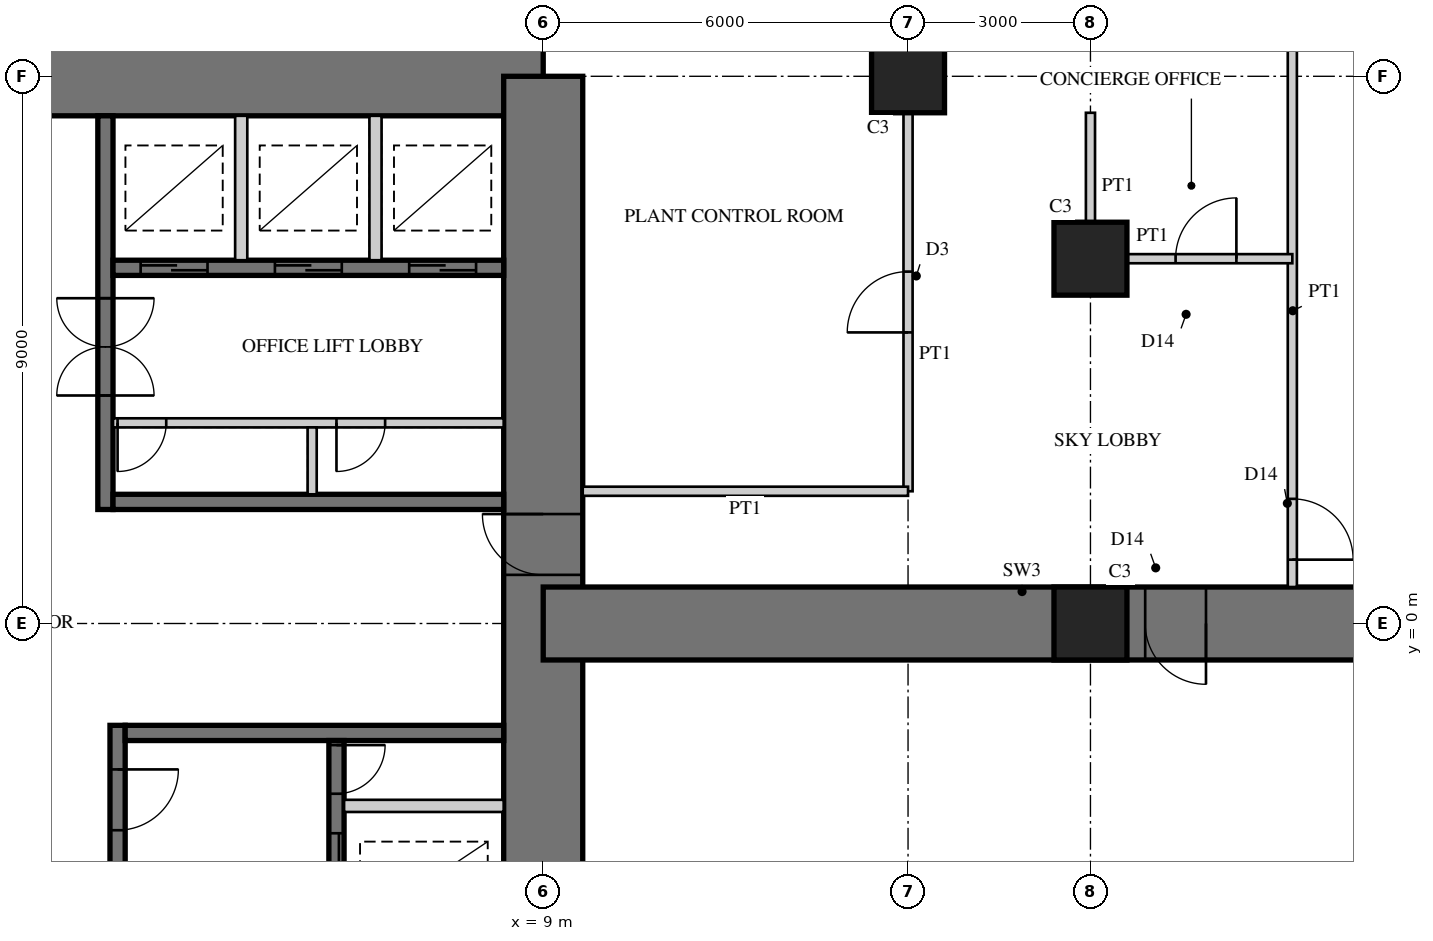
"""IFC4 building model, lengths in metres.
Left out: names, types, materials, properties, quantities, classifications, styles, units other than length and angle.
Written with IfcOpenShell. Run it as: python <this file> out.ifc"""

import sys

from ifc_helpers import new_model, si_unit, direction, frame, frame_2d, origin, origin_2d, place, context, subcontext, project, spatial, rectangle, extrude, element, fill, save


model = new_model("IFC4")
c1 = context("Model", 3, precision=1e-05, world=origin(), true_north=direction((0.0, 1.0)))
c2 = subcontext(c1, "Body", "Model", "MODEL_VIEW")
j1 = project(units=[si_unit("LENGTHUNIT", "METRE"), si_unit("PLANEANGLEUNIT", "RADIAN")], contexts=[c1])
p1 = place(None, origin())
s1 = spatial("IfcSite", under=j1, at=p1, CompositionType="ELEMENT")
p2 = place(p1, origin())
s2 = spatial("IfcBuilding", under=s1, at=p2, CompositionType="ELEMENT")
p3 = place(p2, frame((0.0, 0.0, 95.5)))
s3 = spatial("IfcBuildingStorey", under=s2, at=p3, CompositionType="ELEMENT", Elevation=95.5)
p4 = place(p3, frame((9.0, 9.0, 0.0), z_axis=(0.0, 0.0, 1.0), x_axis=(-1.0, 0.0, 0.0)))
e1 = element("IfcWall", 1, at=p4, inside=s3, PredefinedType="SHEAR", context=c2, shape_type="SweptSolid", body=[
    extrude(rectangle(XDim=18.0, YDim=1.3, at=frame_2d((9.0, 0.0))), origin(), (0.0, 0.0, 1.0), 5.0),
])
p5 = place(p4, frame((9.8, 0.0, 0.0)))
e2 = element("IfcOpeningElement", 2, at=p5, cuts=e1, PredefinedType="OPENING", context=c2, shape_type="SweptSolid", body=[
    extrude(rectangle(XDim=1.0, YDim=2.4, at=frame_2d((0.5, 1.2))), frame((0.0, 0.66, 0.0), z_axis=(0.0, -1.0, 0.0), x_axis=(1.0, 0.0, 0.0)), (0.0, 0.0, 1.0), 1.32),
])
p6 = place(p3, frame((9.0, -9.0, 0.0), z_axis=(0.0, 0.0, 1.0), x_axis=(0.0, 1.0, 0.0)))
e3 = element("IfcWall", 3, at=p6, inside=s3, PredefinedType="SHEAR", context=c2, shape_type="SweptSolid", body=[
    extrude(rectangle(XDim=18.0, YDim=1.3, at=frame_2d((9.0, 0.0))), origin(), (0.0, 0.0, 1.0), 5.0),
])
p7 = place(p6, frame((9.8, 0.0, 0.0)))
e4 = element("IfcOpeningElement", 4, at=p7, cuts=e3, PredefinedType="OPENING", context=c2, shape_type="SweptSolid", body=[
    extrude(rectangle(XDim=1.0, YDim=2.4, at=frame_2d((0.5, 1.2))), frame((0.0, 0.66, 0.0), z_axis=(0.0, -1.0, 0.0), x_axis=(1.0, 0.0, 0.0)), (0.0, 0.0, 1.0), 1.32),
])
p8 = place(p3, frame((1.8, 1.875, 0.0), z_axis=(0.0, 0.0, 1.0), x_axis=(0.0, 1.0, 0.0)))
e5 = element("IfcWall", 5, at=p8, inside=s3, PredefinedType="SHEAR", context=c2, shape_type="SweptSolid", body=[
    extrude(rectangle(XDim=6.475, YDim=0.25, at=frame_2d((3.238, 0.0))), origin(), (0.0, 0.0, 1.0), 5.0),
])
p9 = place(p8, frame((1.875, 0.0, 0.0)))
e6 = element("IfcOpeningElement", 6, at=p9, cuts=e5, PredefinedType="OPENING", context=c2, shape_type="SweptSolid", body=[
    extrude(rectangle(XDim=1.6, YDim=2.4, at=frame_2d((0.8, 1.2))), frame((0.0, 0.135, 0.0), z_axis=(0.0, -1.0, 0.0), x_axis=(1.0, 0.0, 0.0)), (0.0, 0.0, 1.0), 0.27),
])
p10 = place(p3, frame((1.925, 2.0, 0.0), z_axis=(0.0, 0.0, 1.0), x_axis=(1.0, 0.0, 0.0)))
e7 = element("IfcWall", 7, at=p10, inside=s3, PredefinedType="SHEAR", context=c2, shape_type="SweptSolid", body=[
    extrude(rectangle(XDim=6.425, YDim=0.25, at=frame_2d((3.212, 0.0))), origin(), (0.0, 0.0, 1.0), 5.0),
])
p11 = place(p3, frame((1.925, 5.85, 0.0), z_axis=(0.0, 0.0, 1.0), x_axis=(1.0, 0.0, 0.0)))
e8 = element("IfcWall", 8, at=p11, inside=s3, PredefinedType="SHEAR", context=c2, shape_type="SweptSolid", body=[
    extrude(rectangle(XDim=6.425, YDim=0.25, at=frame_2d((3.212, 0.0))), origin(), (0.0, 0.0, 1.0), 5.0),
])
p12 = place(p11, frame((0.454, 0.0, 0.0)))
e9 = element("IfcOpeningElement", 9, at=p12, cuts=e8, PredefinedType="OPENING", context=c2, shape_type="SweptSolid", body=[
    extrude(rectangle(XDim=1.1, YDim=2.2, at=frame_2d((0.55, 1.1))), frame((0.0, 0.135, 0.0), z_axis=(0.0, -1.0, 0.0), x_axis=(1.0, 0.0, 0.0)), (0.0, 0.0, 1.0), 0.27),
])
p13 = place(p11, frame((2.663, 0.0, 0.0)))
e10 = element("IfcOpeningElement", 10, at=p13, cuts=e8, PredefinedType="OPENING", context=c2, shape_type="SweptSolid", body=[
    extrude(rectangle(XDim=1.1, YDim=2.2, at=frame_2d((0.55, 1.1))), frame((0.0, 0.135, 0.0), z_axis=(0.0, -1.0, 0.0), x_axis=(1.0, 0.0, 0.0)), (0.0, 0.0, 1.0), 0.27),
])
p14 = place(p11, frame((4.871, 0.0, 0.0)))
e11 = element("IfcOpeningElement", 11, at=p14, cuts=e8, PredefinedType="OPENING", context=c2, shape_type="SweptSolid", body=[
    extrude(rectangle(XDim=1.1, YDim=2.2, at=frame_2d((0.55, 1.1))), frame((0.0, 0.135, 0.0), z_axis=(0.0, -1.0, 0.0), x_axis=(1.0, 0.0, 0.0)), (0.0, 0.0, 1.0), 0.27),
])
p15 = place(p3, frame((1.925, 3.3, 0.0), z_axis=(0.0, 0.0, 1.0), x_axis=(1.0, 0.0, 0.0)))
e12 = element("IfcWall", 12, at=p15, inside=s3, PredefinedType="PARTITIONING", context=c2, shape_type="SweptSolid", body=[
    extrude(rectangle(XDim=6.425, YDim=0.15, at=frame_2d((3.212, 0.0))), origin(), (0.0, 0.0, 1.0), 5.0),
])
p16 = place(p15, frame((0.075, 0.0, 0.0)))
e13 = element("IfcOpeningElement", 13, at=p16, cuts=e12, PredefinedType="OPENING", context=c2, shape_type="SweptSolid", body=[
    extrude(rectangle(XDim=0.8, YDim=2.1, at=frame_2d((0.4, 1.05))), frame((0.0, 0.085, 0.0), z_axis=(0.0, -1.0, 0.0), x_axis=(1.0, 0.0, 0.0)), (0.0, 0.0, 1.0), 0.17),
])
p17 = place(p15, frame((3.675, 0.0, 0.0)))
e14 = element("IfcOpeningElement", 14, at=p17, cuts=e12, PredefinedType="OPENING", context=c2, shape_type="SweptSolid", body=[
    extrude(rectangle(XDim=0.8, YDim=2.1, at=frame_2d((0.4, 1.05))), frame((0.0, 0.085, 0.0), z_axis=(0.0, -1.0, 0.0), x_axis=(1.0, 0.0, 0.0)), (0.0, 0.0, 1.0), 0.17),
])
p18 = place(p3, frame((5.2, 2.125, 0.0), z_axis=(0.0, 0.0, 1.0), x_axis=(0.0, 1.0, 0.0)))
e15 = element("IfcWall", 15, at=p18, inside=s3, PredefinedType="PARTITIONING", context=c2, shape_type="SweptSolid", body=[
    extrude(rectangle(XDim=1.1, YDim=0.15, at=frame_2d((0.55, 0.0))), origin(), (0.0, 0.0, 1.0), 5.0),
])
for number, where, z_axis, x_axis in (
    (16, (4.033, 5.975, 0.0), (0.0, 0.0, 1.0), (0.0, 1.0, 0.0)),
    (17, (6.242, 5.975, 0.0), (0.0, 0.0, 1.0), (0.0, 1.0, 0.0)),
):
    element("IfcWall", number, at=place(p3, frame(where, z_axis=z_axis, x_axis=x_axis)), inside=s3, PredefinedType="PARTITIONING", context=c2, shape_type="SweptSolid", body=[
        extrude(rectangle(XDim=2.375, YDim=0.2, at=frame_2d((1.188, 0.0))), origin(), (0.0, 0.0, 1.0), 5.0),
    ])
p19 = place(p3, frame((2.0, -1.675, 0.0), z_axis=(0.0, 0.0, 1.0), x_axis=(0.0, -1.0, 0.0)))
e18 = element("IfcWall", 18, at=p19, inside=s3, PredefinedType="SHEAR", context=c2, shape_type="SweptSolid", body=[
    extrude(rectangle(XDim=6.675, YDim=0.25, at=frame_2d((3.337, 0.0))), origin(), (0.0, 0.0, 1.0), 5.0),
])
p20 = place(p19, frame((0.725, 0.0, 0.0)))
e19 = element("IfcOpeningElement", 19, at=p20, cuts=e18, PredefinedType="OPENING", context=c2, shape_type="SweptSolid", body=[
    extrude(rectangle(XDim=1.0, YDim=2.1, at=frame_2d((0.5, 1.05))), frame((0.0, 0.135, 0.0), z_axis=(0.0, -1.0, 0.0), x_axis=(1.0, 0.0, 0.0)), (0.0, 0.0, 1.0), 0.27),
])
p21 = place(p3, frame((2.125, -1.8, 0.0), z_axis=(0.0, 0.0, 1.0), x_axis=(1.0, 0.0, 0.0)))
e20 = element("IfcWall", 20, at=p21, inside=s3, PredefinedType="SHEAR", context=c2, shape_type="SweptSolid", body=[
    extrude(rectangle(XDim=6.225, YDim=0.25, at=frame_2d((3.113, 0.0))), origin(), (0.0, 0.0, 1.0), 5.0),
])
p22 = place(p3, frame((5.6, -1.925, 0.0), z_axis=(0.0, 0.0, 1.0), x_axis=(0.0, -1.0, 0.0)))
e21 = element("IfcWall", 21, at=p22, inside=s3, PredefinedType="SHEAR", context=c2, shape_type="SweptSolid", body=[
    extrude(rectangle(XDim=3.55, YDim=0.25, at=frame_2d((1.775, 0.0))), origin(), (0.0, 0.0, 1.0), 5.0),
])
p23 = place(p22, frame((1.525, 0.0, 0.0)))
e22 = element("IfcOpeningElement", 22, at=p23, cuts=e21, PredefinedType="OPENING", context=c2, shape_type="SweptSolid", body=[
    extrude(rectangle(XDim=1.1, YDim=2.2, at=frame_2d((0.55, 1.1))), frame((0.0, 0.135, 0.0), z_axis=(0.0, -1.0, 0.0), x_axis=(1.0, 0.0, 0.0)), (0.0, 0.0, 1.0), 0.27),
])
p24 = place(p22, frame((0.075, 0.0, 0.0)))
e23 = element("IfcOpeningElement", 23, at=p24, cuts=e21, PredefinedType="OPENING", context=c2, shape_type="SweptSolid", body=[
    extrude(rectangle(XDim=0.8, YDim=2.1, at=frame_2d((0.4, 1.05))), frame((0.0, 0.135, 0.0), z_axis=(0.0, -1.0, 0.0), x_axis=(1.0, 0.0, 0.0)), (0.0, 0.0, 1.0), 0.27),
])
p25 = place(p3, frame((5.725, -3.0, 0.0), z_axis=(0.0, 0.0, 1.0), x_axis=(1.0, 0.0, 0.0)))
e24 = element("IfcWall", 24, at=p25, inside=s3, PredefinedType="PARTITIONING", context=c2, shape_type="SweptSolid", body=[
    extrude(rectangle(XDim=2.625, YDim=0.2, at=frame_2d((1.312, 0.0))), origin(), (0.0, 0.0, 1.0), 5.0),
])
p26 = place(p3, frame((9.0, 0.0, 0.0), z_axis=(0.0, 0.0, 1.0), x_axis=(1.0, 0.0, 0.0)))
e25 = element("IfcWall", 25, at=p26, inside=s3, PredefinedType="SHEAR", context=c2, shape_type="SweptSolid", body=[
    extrude(rectangle(XDim=18.0, YDim=1.2, at=frame_2d((9.0, 0.0))), origin(), (0.0, 0.0, 1.0), 5.0),
])
p27 = place(p26, frame((9.9, 0.0, 0.0)))
e26 = element("IfcOpeningElement", 26, at=p27, cuts=e25, PredefinedType="OPENING", context=c2, shape_type="SweptSolid", body=[
    extrude(rectangle(XDim=1.0, YDim=2.2, at=frame_2d((0.5, 1.1))), frame((0.0, 0.61, 0.0), z_axis=(0.0, -1.0, 0.0), x_axis=(1.0, 0.0, 0.0)), (0.0, 0.0, 1.0), 1.22),
])
for number, where, z_axis, x_axis in (
    (27, (15.0, 9.0, 0.0), (0.0, 0.0, 1.0), (1.0, 0.0, 0.0)),
    (28, (18.0, 0.0, 0.0), (0.0, 0.0, 1.0), (1.0, 0.0, 0.0)),
    (29, (18.0, 6.0, 0.0), (0.0, 0.0, 1.0), (1.0, 0.0, 0.0)),
):
    element("IfcColumn", number, at=place(p3, frame(where, z_axis=z_axis, x_axis=x_axis)), inside=s3, PredefinedType="COLUMN", context=c2, shape_type="SweptSolid", body=[
        extrude(rectangle(XDim=1.2, YDim=1.2, at=origin_2d()), origin(), (0.0, 0.0, 1.0), 5.0),
    ])
p28 = place(p3, frame((21.32, 0.6, 0.0), z_axis=(0.0, 0.0, 1.0), x_axis=(0.0, 1.0, 0.0)))
e30 = element("IfcWall", 30, at=p28, inside=s3, PredefinedType="PARTITIONING", context=c2, shape_type="SweptSolid", body=[
    extrude(rectangle(XDim=9.08, YDim=0.15, at=frame_2d((4.54, 0.0))), origin(), (0.0, 0.0, 1.0), 4.8),
])
p29 = place(p28, frame((0.45, 0.0, 0.0)))
e31 = element("IfcOpeningElement", 31, at=p29, cuts=e30, PredefinedType="OPENING", context=c2, shape_type="SweptSolid", body=[
    extrude(rectangle(XDim=1.0, YDim=2.2, at=frame_2d((0.5, 1.1))), frame((0.0, 0.085, 0.0), z_axis=(0.0, -1.0, 0.0), x_axis=(1.0, 0.0, 0.0)), (0.0, 0.0, 1.0), 0.17),
])
p30 = place(p3, frame((15.0, 2.175, 0.0), z_axis=(0.0, 0.0, 1.0), x_axis=(0.0, 1.0, 0.0)))
e32 = element("IfcWall", 32, at=p30, inside=s3, PredefinedType="PARTITIONING", context=c2, shape_type="SweptSolid", body=[
    extrude(rectangle(XDim=6.225, YDim=0.15, at=frame_2d((3.112, 0.0))), origin(), (0.0, 0.0, 1.0), 3.95),
])
p31 = place(p30, frame((2.613, 0.0, 0.0)))
e33 = element("IfcOpeningElement", 33, at=p31, cuts=e32, PredefinedType="OPENING", context=c2, shape_type="SweptSolid", body=[
    extrude(rectangle(XDim=1.0, YDim=2.1, at=frame_2d((0.5, 1.05))), frame((0.0, 0.085, 0.0), z_axis=(0.0, -1.0, 0.0), x_axis=(1.0, 0.0, 0.0)), (0.0, 0.0, 1.0), 0.17),
])
p32 = place(p3, frame((9.65, 2.175, 0.0), z_axis=(0.0, 0.0, 1.0), x_axis=(1.0, 0.0, 0.0)))
e34 = element("IfcWall", 34, at=p32, inside=s3, PredefinedType="PARTITIONING", context=c2, shape_type="SweptSolid", body=[
    extrude(rectangle(XDim=5.35, YDim=0.15, at=frame_2d((2.675, 0.0))), origin(), (0.0, 0.0, 1.0), 4.8),
])
p33 = place(p3, frame((18.0, 6.0, 0.0), z_axis=(0.0, 0.0, 1.0), x_axis=(1.0, 0.0, 0.0)))
e35 = element("IfcWall", 35, at=p33, inside=s3, PredefinedType="PARTITIONING", context=c2, shape_type="SweptSolid", body=[
    extrude(rectangle(XDim=3.32, YDim=0.15, at=frame_2d((1.66, 0.0))), origin(), (0.0, 0.0, 1.0), 4.0),
])
p34 = place(p33, frame((1.4, 0.0, 0.0)))
e36 = element("IfcOpeningElement", 36, at=p34, cuts=e35, PredefinedType="OPENING", context=c2, shape_type="SweptSolid", body=[
    extrude(rectangle(XDim=1.0, YDim=2.2, at=frame_2d((0.5, 1.1))), frame((0.0, 0.085, 0.0), z_axis=(0.0, -1.0, 0.0), x_axis=(1.0, 0.0, 0.0)), (0.0, 0.0, 1.0), 0.17),
])
p35 = place(p3, frame((18.0, 6.0, 0.0), z_axis=(0.0, 0.0, 1.0), x_axis=(0.0, 1.0, 0.0)))
e37 = element("IfcWall", 37, at=p35, inside=s3, PredefinedType="PARTITIONING", context=c2, shape_type="SweptSolid", body=[
    extrude(rectangle(XDim=2.4, YDim=0.15, at=frame_2d((1.2, 0.0))), origin(), (0.0, 0.0, 1.0), 3.95),
])
p36 = place(p29, frame((1.0, 0.0, 0.0), z_axis=(0.0, 0.0, 1.0), x_axis=(-1.0, 0.0, 0.0)))
e38 = element("IfcDoor", 38, at=p36, inside=s3, OperationType="SINGLE_SWING_RIGHT", PredefinedType="DOOR", context=c2, shape_type="SweptSolid", body=[
    extrude(rectangle(XDim=1.0, YDim=2.2, at=frame_2d((0.5, 1.1))), frame((0.0, 0.025, 0.0), z_axis=(0.0, -1.0, 0.0), x_axis=(1.0, 0.0, 0.0)), (0.0, 0.0, 1.0), 0.05),
])
fill(e31, e38)
p37 = place(p31, origin())
e39 = element("IfcDoor", 39, at=p37, inside=s3, OperationType="SINGLE_SWING_LEFT", PredefinedType="DOOR", context=c2, shape_type="SweptSolid", body=[
    extrude(rectangle(XDim=1.0, YDim=2.1, at=frame_2d((0.5, 1.05))), frame((0.0, 0.025, 0.0), z_axis=(0.0, -1.0, 0.0), x_axis=(1.0, 0.0, 0.0)), (0.0, 0.0, 1.0), 0.05),
])
fill(e33, e39)
p38 = place(p34, origin())
e40 = element("IfcDoor", 40, at=p38, inside=s3, OperationType="SINGLE_SWING_RIGHT", PredefinedType="DOOR", context=c2, shape_type="SweptSolid", body=[
    extrude(rectangle(XDim=1.0, YDim=2.2, at=frame_2d((0.5, 1.1))), frame((0.0, 0.025, 0.0), z_axis=(0.0, -1.0, 0.0), x_axis=(1.0, 0.0, 0.0)), (0.0, 0.0, 1.0), 0.05),
])
fill(e36, e40)
p39 = place(p27, frame((1.0, 0.0, 0.0), z_axis=(0.0, 0.0, 1.0), x_axis=(-1.0, 0.0, 0.0)))
e41 = element("IfcDoor", 41, at=p39, inside=s3, OperationType="SINGLE_SWING_LEFT", PredefinedType="DOOR", context=c2, shape_type="SweptSolid", body=[
    extrude(rectangle(XDim=1.0, YDim=2.2, at=frame_2d((0.5, 1.1))), frame((0.0, 0.025, 0.0), z_axis=(0.0, -1.0, 0.0), x_axis=(1.0, 0.0, 0.0)), (0.0, 0.0, 1.0), 0.05),
])
fill(e26, e41)
p40 = place(p7, origin())
e42 = element("IfcDoor", 42, at=p40, inside=s3, OperationType="SINGLE_SWING_RIGHT", PredefinedType="DOOR", context=c2, shape_type="SweptSolid", body=[
    extrude(rectangle(XDim=1.0, YDim=2.4, at=frame_2d((0.5, 1.2))), frame((0.0, 0.055, 0.0), z_axis=(0.0, -1.0, 0.0), x_axis=(1.0, 0.0, 0.0)), (0.0, 0.0, 1.0), 0.05),
])
fill(e4, e42)
p41 = place(p12, origin())
e43 = element("IfcDoor", 43, at=p41, inside=s3, OperationType="DOUBLE_DOOR_SLIDING", PredefinedType="DOOR", context=c2, shape_type="SweptSolid", body=[
    extrude(rectangle(XDim=1.1, YDim=2.2, at=frame_2d((0.55, 1.1))), frame((0.0, 0.025, 0.0), z_axis=(0.0, -1.0, 0.0), x_axis=(1.0, 0.0, 0.0)), (0.0, 0.0, 1.0), 0.05),
])
fill(e9, e43)
p42 = place(p13, origin())
e44 = element("IfcDoor", 44, at=p42, inside=s3, OperationType="DOUBLE_DOOR_SLIDING", PredefinedType="DOOR", context=c2, shape_type="SweptSolid", body=[
    extrude(rectangle(XDim=1.1, YDim=2.2, at=frame_2d((0.55, 1.1))), frame((0.0, 0.025, 0.0), z_axis=(0.0, -1.0, 0.0), x_axis=(1.0, 0.0, 0.0)), (0.0, 0.0, 1.0), 0.05),
])
fill(e10, e44)
p43 = place(p14, origin())
e45 = element("IfcDoor", 45, at=p43, inside=s3, OperationType="DOUBLE_DOOR_SLIDING", PredefinedType="DOOR", context=c2, shape_type="SweptSolid", body=[
    extrude(rectangle(XDim=1.1, YDim=2.2, at=frame_2d((0.55, 1.1))), frame((0.0, 0.025, 0.0), z_axis=(0.0, -1.0, 0.0), x_axis=(1.0, 0.0, 0.0)), (0.0, 0.0, 1.0), 0.05),
])
fill(e11, e45)
p44 = place(p9, origin())
e46 = element("IfcDoor", 46, at=p44, inside=s3, OperationType="DOUBLE_DOOR_DOUBLE_SWING", PredefinedType="DOOR", context=c2, shape_type="SweptSolid", body=[
    extrude(rectangle(XDim=1.6, YDim=2.4, at=frame_2d((0.8, 1.2))), frame((0.0, 0.025, 0.0), z_axis=(0.0, -1.0, 0.0), x_axis=(1.0, 0.0, 0.0)), (0.0, 0.0, 1.0), 0.05),
])
fill(e6, e46)
p45 = place(p16, frame((0.8, 0.0, 0.0), z_axis=(0.0, 0.0, 1.0), x_axis=(-1.0, 0.0, 0.0)))
e47 = element("IfcDoor", 47, at=p45, inside=s3, OperationType="SINGLE_SWING_RIGHT", PredefinedType="DOOR", context=c2, shape_type="SweptSolid", body=[
    extrude(rectangle(XDim=0.8, YDim=2.1, at=frame_2d((0.4, 1.05))), frame((0.0, 0.025, 0.0), z_axis=(0.0, -1.0, 0.0), x_axis=(1.0, 0.0, 0.0)), (0.0, 0.0, 1.0), 0.05),
])
fill(e13, e47)
p46 = place(p17, frame((0.8, 0.0, 0.0), z_axis=(0.0, 0.0, 1.0), x_axis=(-1.0, 0.0, 0.0)))
e48 = element("IfcDoor", 48, at=p46, inside=s3, OperationType="SINGLE_SWING_RIGHT", PredefinedType="DOOR", context=c2, shape_type="SweptSolid", body=[
    extrude(rectangle(XDim=0.8, YDim=2.1, at=frame_2d((0.4, 1.05))), frame((0.0, 0.025, 0.0), z_axis=(0.0, -1.0, 0.0), x_axis=(1.0, 0.0, 0.0)), (0.0, 0.0, 1.0), 0.05),
])
fill(e14, e48)
p47 = place(p20, origin())
e49 = element("IfcDoor", 49, at=p47, inside=s3, OperationType="SINGLE_SWING_LEFT", PredefinedType="DOOR", context=c2, shape_type="SweptSolid", body=[
    extrude(rectangle(XDim=1.0, YDim=2.1, at=frame_2d((0.5, 1.05))), frame((0.0, 0.025, 0.0), z_axis=(0.0, -1.0, 0.0), x_axis=(1.0, 0.0, 0.0)), (0.0, 0.0, 1.0), 0.05),
])
fill(e19, e49)
p48 = place(p23, origin())
e50 = element("IfcDoor", 50, at=p48, inside=s3, OperationType="DOUBLE_DOOR_SLIDING", PredefinedType="DOOR", context=c2, shape_type="SweptSolid", body=[
    extrude(rectangle(XDim=1.1, YDim=2.2, at=frame_2d((0.55, 1.1))), frame((0.0, 0.025, 0.0), z_axis=(0.0, -1.0, 0.0), x_axis=(1.0, 0.0, 0.0)), (0.0, 0.0, 1.0), 0.05),
])
fill(e22, e50)
p49 = place(p24, origin())
e51 = element("IfcDoor", 51, at=p49, inside=s3, OperationType="SINGLE_SWING_LEFT", PredefinedType="DOOR", context=c2, shape_type="SweptSolid", body=[
    extrude(rectangle(XDim=0.8, YDim=2.1, at=frame_2d((0.4, 1.05))), frame((0.0, 0.025, 0.0), z_axis=(0.0, -1.0, 0.0), x_axis=(1.0, 0.0, 0.0)), (0.0, 0.0, 1.0), 0.05),
])
fill(e23, e51)
save(model, sys.argv[1])
